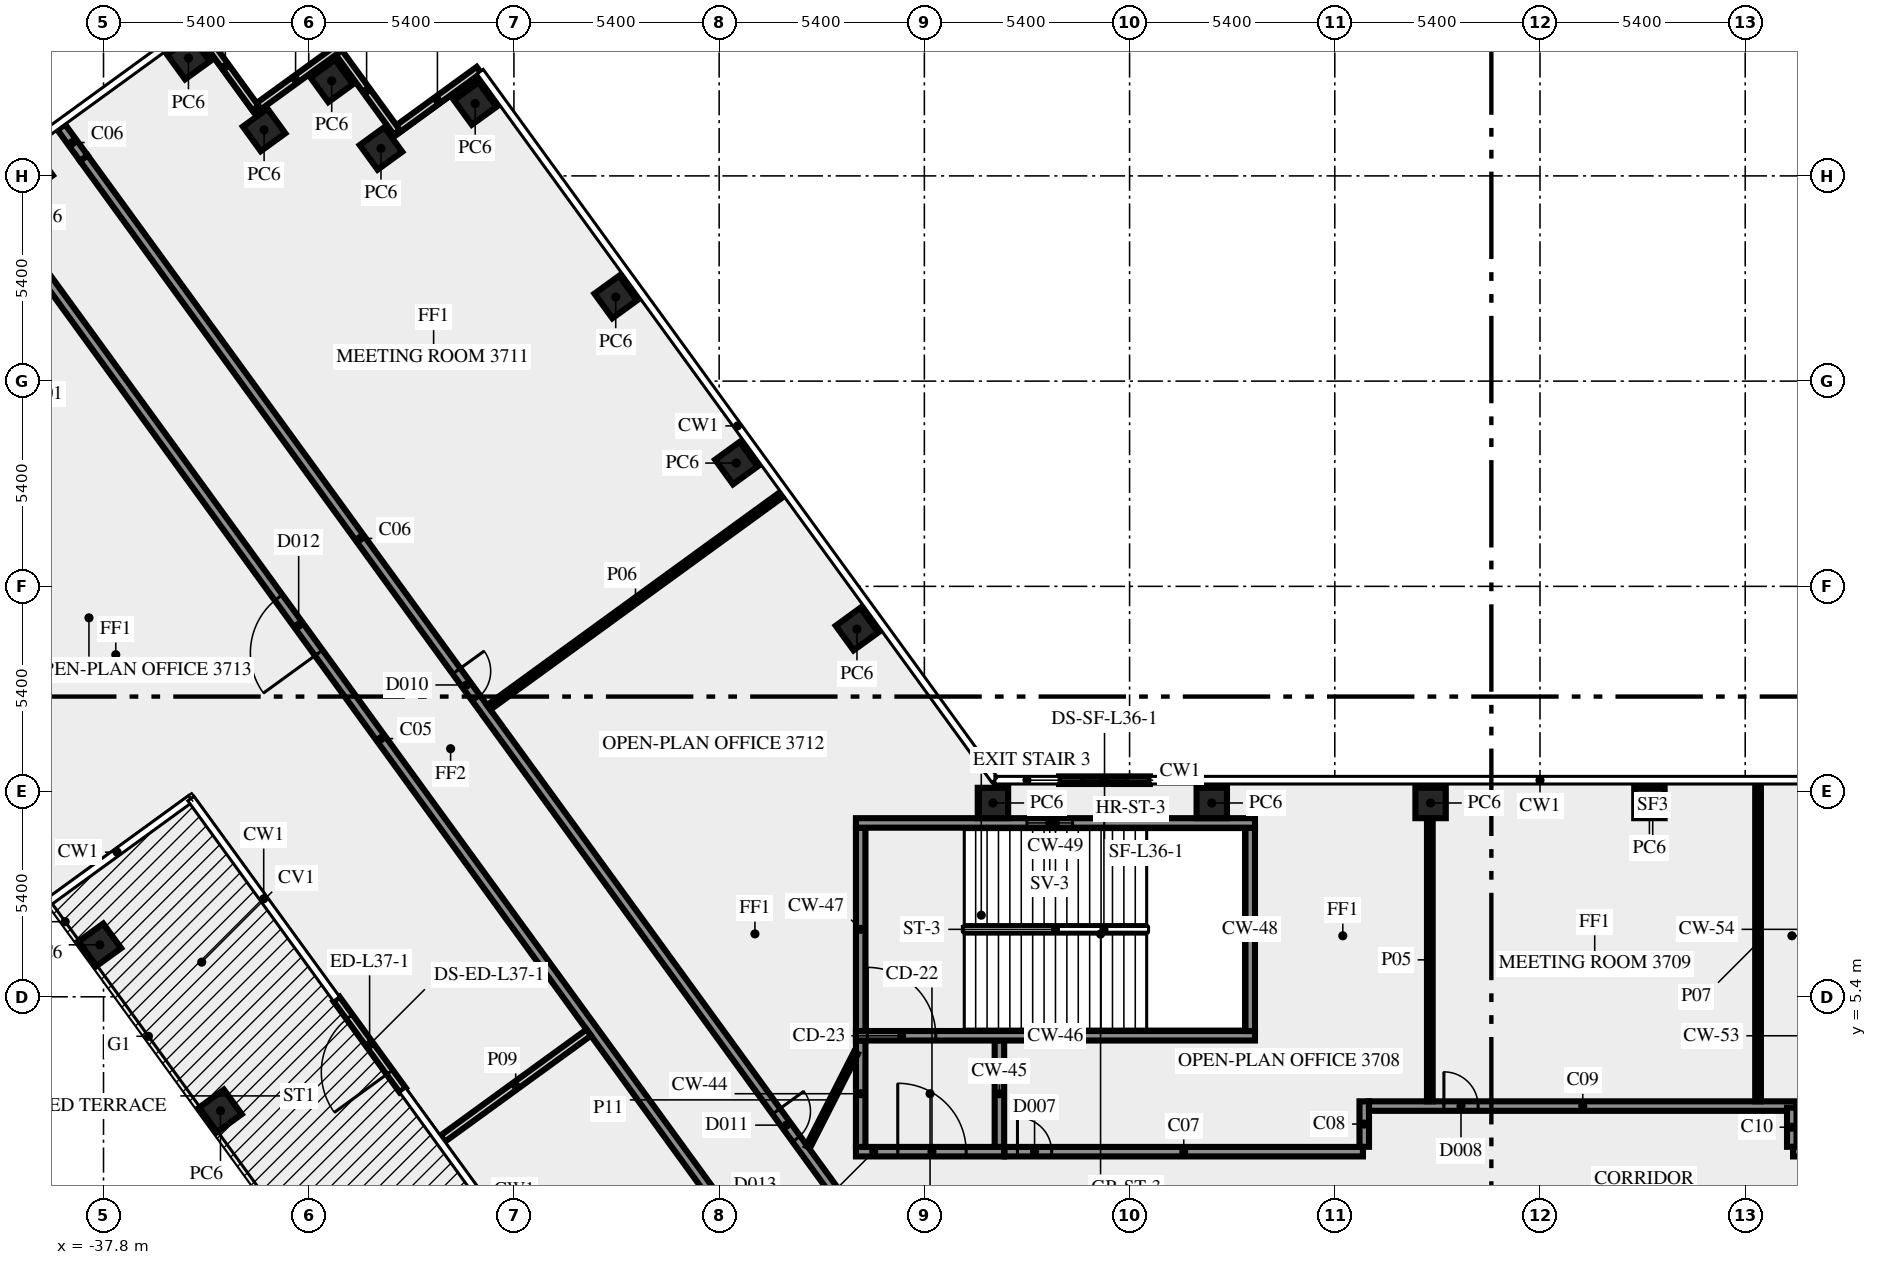
"""IFC4 building model, lengths in metres.
Left out: names, types, materials, properties, quantities, classifications, styles, units other than length and angle.
Written with IfcOpenShell. Run it as: python <this file> out.ifc"""

import sys

from ifc_helpers import new_model, si_unit, direction, frame, frame_2d, origin, origin_2d, place, context, subcontext, project, spatial, rectangle, extrude, element, fill, save


model = new_model("IFC4")
c1 = context("Model", 3, precision=1e-05, world=origin(), true_north=direction((0.0, 1.0)))
c2 = subcontext(c1, "Body", "Model", "MODEL_VIEW")
j1 = project(units=[si_unit("LENGTHUNIT", "METRE"), si_unit("PLANEANGLEUNIT", "RADIAN")], contexts=[c1])
p1 = place(None, origin())
s1 = spatial("IfcSite", under=j1, at=p1, CompositionType="ELEMENT")
p2 = place(p1, origin())
s2 = spatial("IfcBuilding", under=s1, at=p2, CompositionType="ELEMENT")
p3 = place(p2, frame((0.0, 0.0, 160.0)))
s3 = spatial("IfcBuildingStorey", under=s2, at=p3, CompositionType="ELEMENT", Elevation=160.0)
for number, where, z_axis, x_axis in (
    (1, (-17.974, 15.075, 0.0), (0.0, 0.0, 1.0), (-0.588, 0.809, 0.0)),
    (2, (-21.147, 19.444, 0.0), (0.0, 0.0, 1.0), (-0.588, 0.809, 0.0)),
    (3, (-24.321, 23.812, 0.0), (0.0, 0.0, 1.0), (-0.588, 0.809, 0.0)),
    (4, (-28.02, 28.905, 0.0), (0.0, 0.0, 1.0), (-0.809, -0.588, 0.0)),
    (5, (-30.499, 27.723, 0.0), (0.0, 0.0, 1.0), (-0.809, -0.588, 0.0)),
    (6, (-31.795, 29.5, 0.0), (0.0, 0.0, 1.0), (-0.588, 0.809, 0.0)),
    (7, (-33.574, 28.209, 0.0), (0.0, 0.0, 1.0), (-0.588, 0.809, 0.0)),
    (8, (-35.565, 30.1, 0.0), (0.0, 0.0, 1.0), (-0.809, -0.588, 0.0)),
    (9, (-39.691, 27.102, 0.0), (0.0, 0.0, 1.0), (-0.809, -0.588, 0.0)),
    (10, (-37.896, 6.769, 0.0), (0.0, 0.0, 1.0), (0.588, -0.809, 0.0)),
    (11, (-34.722, 2.4, 0.0), (0.0, 0.0, 1.0), (0.588, -0.809, 0.0)),
    (12, (2.879, 10.5, 0.0), (0.0, 0.0, 1.0), (-1.0, 0.0, 0.0)),
    (13, (-2.879, 10.5, 0.0), (0.0, 0.0, 1.0), (-1.0, 0.0, 0.0)),
    (14, (-8.637, 10.5, 0.0), (0.0, 0.0, 1.0), (-1.0, 0.0, 0.0)),
    (15, (-14.395, 10.5, 0.0), (0.0, 0.0, 1.0), (-1.0, 0.0, 0.0)),
):
    element("IfcColumn", number, at=place(p3, frame(where, z_axis=z_axis, x_axis=x_axis)), inside=s3, PredefinedType="COLUMN", context=c2, shape_type="SweptSolid", body=[
        extrude(rectangle(XDim=0.8, YDim=0.8, at=origin_2d()), origin(), (0.0, 0.0, 1.0), 3.65),
    ])
p4 = place(p3, frame((-29.927, 2.946, 0.0), z_axis=(0.0, 0.0, 1.0), x_axis=(-0.58782869016, 0.808985433135, 0.0)))
e16 = element("IfcWall", 16, at=p4, inside=s3, PredefinedType="SOLIDWALL", context=c2, shape_type="SweptSolid", body=[
    extrude(rectangle(XDim=2.963, YDim=0.2, at=frame_2d((1.481, 0.0))), origin(), (0.0, 0.0, 1.0), 3.65),
])
p5 = place(p4, frame((0.582, 0.0, 0.0)))
e17 = element("IfcOpeningElement", 17, at=p5, cuts=e16, PredefinedType="OPENING", context=c2, shape_type="SweptSolid", body=[
    extrude(rectangle(XDim=1.8, YDim=2.4, at=frame_2d((0.9, 1.2))), frame((0.0, 0.11, 0.0), z_axis=(0.0, -1.0, 0.0), x_axis=(1.0, 0.0, 0.0)), (0.0, 0.0, 1.0), 0.22),
])
for number, where, z_axis, x_axis in (
    (18, (-27.921, 29.787, 0.0), (0.0, 0.0, 1.0), (-0.809, -0.588, 0.0)),
    (19, (-30.083, 28.149, 0.0), (0.0, 0.0, 1.0), (-0.588, 0.809, 0.0)),
    (20, (-31.654, 30.331, 0.0), (0.0, 0.0, 1.0), (-0.809, -0.588, 0.0)),
    (21, (-33.801, 28.786, 0.0), (0.0, 0.0, 1.0), (-0.588, 0.809, 0.0)),
):
    element("IfcWall", number, at=place(p3, frame(where, z_axis=z_axis, x_axis=x_axis)), inside=s3, PredefinedType="SOLIDWALL", context=c2, shape_type="SweptSolid", body=[
        extrude(rectangle(XDim=2.7, YDim=0.2, at=frame_2d((1.35, 0.0))), origin(), (0.0, 0.0, 1.0), 3.65),
    ])
p6 = place(p3, frame((-10.263, 11.1, 0.0), z_axis=(0.0, 0.0, 1.0), x_axis=(-1.0, 0.0, 0.0)))
e22 = element("IfcWall", 22, at=p6, inside=s3, PredefinedType="SOLIDWALL", context=c2, shape_type="SweptSolid", body=[
    extrude(rectangle(XDim=2.392, YDim=0.2, at=frame_2d((1.196, 0.0))), origin(), (0.0, 0.0, 1.0), 3.65),
])
p7 = place(p6, frame((0.596, 0.0, 1.0)))
e23 = element("IfcOpeningElement", 23, at=p7, cuts=e22, PredefinedType="OPENING", context=c2, shape_type="SweptSolid", body=[
    extrude(rectangle(XDim=1.2, YDim=1.2, at=frame_2d((0.6, 0.6))), frame((0.0, 0.11, 0.0), z_axis=(0.0, -1.0, 0.0), x_axis=(1.0, 0.0, 0.0)), (0.0, 0.0, 1.0), 0.22),
])
p8 = place(p3, frame((-18.0, 1.325, 0.0), z_axis=(0.0, 0.0, 1.0), x_axis=(1.0, 0.0, 0.0)))
e24 = element("IfcWall", 24, at=p8, inside=s3, PredefinedType="SHEAR", context=c2, shape_type="SweptSolid", body=[
    extrude(rectangle(XDim=3.9, YDim=0.25, at=frame_2d((1.95, 0.0))), origin(), (0.0, 0.0, 1.0), 3.65),
])
p9 = place(p8, frame((1.1, 0.0, 0.0)))
e25 = element("IfcOpeningElement", 25, at=p9, cuts=e24, PredefinedType="OPENING", context=c2, shape_type="SweptSolid", body=[
    extrude(rectangle(XDim=1.8, YDim=2.1, at=frame_2d((0.9, 1.05))), frame((0.0, 0.135, 0.0), z_axis=(0.0, -1.0, 0.0), x_axis=(1.0, 0.0, 0.0)), (0.0, 0.0, 1.0), 0.27),
])
for number, where, z_axis, x_axis in (
    (26, (-17.875, 1.45, 0.0), (0.0, 0.0, 1.0), (0.0, 1.0, 0.0)),
    (27, (-14.225, 1.45, 0.0), (0.0, 0.0, 1.0), (0.0, 1.0, 0.0)),
):
    element("IfcWall", number, at=place(p3, frame(where, z_axis=z_axis, x_axis=x_axis)), inside=s3, PredefinedType="SHEAR", context=c2, shape_type="SweptSolid", body=[
        extrude(rectangle(XDim=2.8, YDim=0.25, at=frame_2d((1.4, 0.0))), origin(), (0.0, 0.0, 1.0), 3.65),
    ])
p10 = place(p3, frame((-18.0, 4.375, 0.0), z_axis=(0.0, 0.0, 1.0), x_axis=(1.0, 0.0, 0.0)))
e28 = element("IfcWall", 28, at=p10, inside=s3, PredefinedType="SHEAR", context=c2, shape_type="SweptSolid", body=[
    extrude(rectangle(XDim=10.5, YDim=0.25, at=frame_2d((5.25, 0.0))), origin(), (0.0, 0.0, 1.0), 3.65),
])
p11 = place(p10, frame((0.3, 0.0, 0.0)))
e29 = element("IfcOpeningElement", 29, at=p11, cuts=e28, PredefinedType="OPENING", context=c2, shape_type="SweptSolid", body=[
    extrude(rectangle(XDim=1.8, YDim=2.1, at=frame_2d((0.9, 1.05))), frame((0.0, 0.135, 0.0), z_axis=(0.0, -1.0, 0.0), x_axis=(1.0, 0.0, 0.0)), (0.0, 0.0, 1.0), 0.27),
])
for number, where, z_axis, x_axis in (
    (30, (-17.875, 4.5, 0.0), (0.0, 0.0, 1.0), (0.0, 1.0, 0.0)),
    (31, (-7.625, 4.5, 0.0), (0.0, 0.0, 1.0), (0.0, 1.0, 0.0)),
):
    element("IfcWall", number, at=place(p3, frame(where, z_axis=z_axis, x_axis=x_axis)), inside=s3, PredefinedType="SHEAR", context=c2, shape_type="SweptSolid", body=[
        extrude(rectangle(XDim=5.35, YDim=0.25, at=frame_2d((2.675, 0.0))), origin(), (0.0, 0.0, 1.0), 3.65),
    ])
p12 = place(p3, frame((-18.0, 9.975, 0.0), z_axis=(0.0, 0.0, 1.0), x_axis=(1.0, 0.0, 0.0)))
e32 = element("IfcWall", 32, at=p12, inside=s3, PredefinedType="SHEAR", context=c2, shape_type="SweptSolid", body=[
    extrude(rectangle(XDim=10.5, YDim=0.25, at=frame_2d((5.25, 0.0))), origin(), (0.0, 0.0, 1.0), 3.65),
])
p13 = place(p12, frame((4.5, 0.0, 1.0)))
e33 = element("IfcOpeningElement", 33, at=p13, cuts=e32, PredefinedType="OPENING", context=c2, shape_type="SweptSolid", body=[
    extrude(rectangle(XDim=1.2, YDim=1.2, at=frame_2d((0.6, 0.6))), frame((0.0, 0.135, 0.0), z_axis=(0.0, -1.0, 0.0), x_axis=(1.0, 0.0, 0.0)), (0.0, 0.0, 1.0), 0.27),
])
p14 = place(p3, frame((6.659, 1.325, 0.0), z_axis=(0.0, 0.0, 1.0), x_axis=(1.0, 0.0, 0.0)))
e34 = element("IfcWall", 34, at=p14, inside=s3, PredefinedType="SOLIDWALL", context=c2, shape_type="SweptSolid", body=[
    extrude(rectangle(XDim=7.431, YDim=0.25, at=frame_2d((3.716, 0.0))), origin(), (0.0, 0.0, 1.0), 3.65),
])
p15 = place(p14, frame((6.191, 0.0, 0.0)))
e35 = element("IfcOpeningElement", 35, at=p15, cuts=e34, PredefinedType="OPENING", context=c2, shape_type="SweptSolid", body=[
    extrude(rectangle(XDim=0.9, YDim=2.1, at=frame_2d((0.45, 1.05))), frame((0.0, 0.135, 0.0), z_axis=(0.0, -1.0, 0.0), x_axis=(1.0, 0.0, 0.0)), (0.0, 0.0, 1.0), 0.27),
])
p16 = place(p3, frame((-20.531, -1.523, 0.0), z_axis=(0.0, 0.0, 1.0), x_axis=(-0.587781654618, 0.809019608226, 0.0)))
e36 = element("IfcWall", 36, at=p16, inside=s3, PredefinedType="SOLIDWALL", context=c2, shape_type="SweptSolid", body=[
    extrude(rectangle(XDim=33.911, YDim=0.25, at=frame_2d((16.956, 0.0))), origin(), (0.0, 0.0, 1.0), 3.65),
])
p17 = place(p16, frame((19.743, 0.0, 0.0)))
e37 = element("IfcOpeningElement", 37, at=p17, cuts=e36, PredefinedType="OPENING", context=c2, shape_type="SweptSolid", body=[
    extrude(rectangle(XDim=1.8, YDim=2.1, at=frame_2d((0.9, 1.05))), frame((0.0, 0.135, 0.0), z_axis=(0.0, -1.0, 0.0), x_axis=(1.0, 0.0, 0.0)), (0.0, 0.0, 1.0), 0.27),
])
p18 = place(p16, frame((0.533, 0.0, 0.0)))
e38 = element("IfcOpeningElement", 38, at=p18, cuts=e36, PredefinedType="OPENING", context=c2, shape_type="SweptSolid", body=[
    extrude(rectangle(XDim=0.9, YDim=2.1, at=frame_2d((0.45, 1.05))), frame((0.0, 0.135, 0.0), z_axis=(0.0, -1.0, 0.0), x_axis=(1.0, 0.0, 0.0)), (0.0, 0.0, 1.0), 0.27),
])
p19 = place(p3, frame((-38.32, 27.469, 0.0), z_axis=(0.0, 0.0, 1.0), x_axis=(0.587788021768, -0.809014982226, 0.0)))
e39 = element("IfcWall", 39, at=p19, inside=s3, PredefinedType="SOLIDWALL", context=c2, shape_type="SweptSolid", body=[
    extrude(rectangle(XDim=35.344, YDim=0.25, at=frame_2d((17.672, 0.0))), origin(), (0.0, 0.0, 1.0), 3.65),
])
p20 = place(p19, frame((31.003, 0.0, 0.0)))
e40 = element("IfcOpeningElement", 40, at=p20, cuts=e39, PredefinedType="OPENING", context=c2, shape_type="SweptSolid", body=[
    extrude(rectangle(XDim=0.9, YDim=2.1, at=frame_2d((0.45, 1.05))), frame((0.0, 0.135, 0.0), z_axis=(0.0, -1.0, 0.0), x_axis=(1.0, 0.0, 0.0)), (0.0, 0.0, 1.0), 0.27),
])
p21 = place(p19, frame((16.687, 0.0, 0.0)))
e41 = element("IfcOpeningElement", 41, at=p21, cuts=e39, PredefinedType="OPENING", context=c2, shape_type="SweptSolid", body=[
    extrude(rectangle(XDim=0.9, YDim=2.1, at=frame_2d((0.45, 1.05))), frame((0.0, 0.135, 0.0), z_axis=(0.0, -1.0, 0.0), x_axis=(1.0, 0.0, 0.0)), (0.0, 0.0, 1.0), 0.27),
])
p22 = place(p3, frame((-14.09, 1.325, 0.0), z_axis=(0.0, 0.0, 1.0), x_axis=(1.0, 0.0, 0.0)))
e42 = element("IfcWall", 42, at=p22, inside=s3, PredefinedType="SOLIDWALL", context=c2, shape_type="SweptSolid", body=[
    extrude(rectangle(XDim=9.431, YDim=0.25, at=frame_2d((4.716, 0.0))), origin(), (0.0, 0.0, 1.0), 3.65),
])
p23 = place(p22, frame((0.34, 0.0, 0.0)))
e43 = element("IfcOpeningElement", 43, at=p23, cuts=e42, PredefinedType="OPENING", context=c2, shape_type="SweptSolid", body=[
    extrude(rectangle(XDim=0.9, YDim=2.1, at=frame_2d((0.45, 1.05))), frame((0.0, 0.135, 0.0), z_axis=(0.0, -1.0, 0.0), x_axis=(1.0, 0.0, 0.0)), (0.0, 0.0, 1.0), 0.27),
])
p24 = place(p3, frame((-4.625, 1.454, 0.0), z_axis=(0.0, 0.0, 1.0), x_axis=(0.0, 1.0, 0.0)))
e44 = element("IfcWall", 44, at=p24, inside=s3, PredefinedType="SOLIDWALL", context=c2, shape_type="SweptSolid", body=[
    extrude(rectangle(XDim=1.196, YDim=0.25, at=frame_2d((0.598, 0.0))), origin(), (0.0, 0.0, 1.0), 3.65),
])
p25 = place(p3, frame((-4.5, 2.525, 0.0), z_axis=(0.0, 0.0, 1.0), x_axis=(1.0, 0.0, 0.0)))
e45 = element("IfcWall", 45, at=p25, inside=s3, PredefinedType="SOLIDWALL", context=c2, shape_type="SweptSolid", body=[
    extrude(rectangle(XDim=11.25, YDim=0.25, at=frame_2d((5.625, 0.0))), origin(), (0.0, 0.0, 1.0), 3.65),
])
p26 = place(p25, frame((1.971, 0.0, 0.0)))
e46 = element("IfcOpeningElement", 46, at=p26, cuts=e45, PredefinedType="OPENING", context=c2, shape_type="SweptSolid", body=[
    extrude(rectangle(XDim=0.9, YDim=2.1, at=frame_2d((0.45, 1.05))), frame((0.0, 0.135, 0.0), z_axis=(0.0, -1.0, 0.0), x_axis=(1.0, 0.0, 0.0)), (0.0, 0.0, 1.0), 0.27),
])
p27 = place(p3, frame((6.625, 2.484, 0.0), z_axis=(0.0, 0.0, 1.0), x_axis=(0.0, -1.0, 0.0)))
e47 = element("IfcWall", 47, at=p27, inside=s3, PredefinedType="SOLIDWALL", context=c2, shape_type="SweptSolid", body=[
    extrude(rectangle(XDim=1.03, YDim=0.25, at=frame_2d((0.515, 0.0))), origin(), (0.0, 0.0, 1.0), 3.65),
])
p28 = place(p3, frame((-2.899, 2.65, 0.0), z_axis=(0.0, 0.0, 1.0), x_axis=(0.0, 1.0, 0.0)))
e48 = element("IfcWall", 48, at=p28, inside=s3, PredefinedType="PARTITIONING", context=c2, shape_type="SweptSolid", body=[
    extrude(rectangle(XDim=7.445, YDim=0.15, at=frame_2d((3.723, 0.0))), origin(), (0.0, 0.0, 1.0), 3.65),
])
p29 = place(p3, frame((-19.938, 18.629, 0.0), z_axis=(0.0, 0.0, 1.0), x_axis=(-0.80900684162, -0.587799226107, 0.0)))
e49 = element("IfcWall", 49, at=p29, inside=s3, PredefinedType="PARTITIONING", context=c2, shape_type="SweptSolid", body=[
    extrude(rectangle(XDim=9.55, YDim=0.15, at=frame_2d((4.775, 0.0))), origin(), (0.0, 0.0, 1.0), 2.85),
])
p30 = place(p3, frame((5.738, 2.65, 0.0), z_axis=(0.0, 0.0, 1.0), x_axis=(0.0, 1.0, 0.0)))
e50 = element("IfcWall", 50, at=p30, inside=s3, PredefinedType="PARTITIONING", context=c2, shape_type="SweptSolid", body=[
    extrude(rectangle(XDim=8.35, YDim=0.15, at=frame_2d((4.175, 0.0))), origin(), (0.0, 0.0, 1.0), 2.85),
])
p31 = place(p3, frame((-28.875, 1.667, 0.0), z_axis=(0.0, 0.0, 1.0), x_axis=(0.80907155287, 0.587710151637, 0.0)))
e51 = element("IfcWall", 51, at=p31, inside=s3, PredefinedType="SOLIDWALL", context=c2, shape_type="SweptSolid", body=[
    extrude(rectangle(XDim=4.75, YDim=0.2, at=frame_2d((2.375, 0.0))), origin(), (0.0, 0.0, 1.0), 3.65),
])
p32 = place(p3, frame((-19.261, 1.45, 0.0), z_axis=(0.0, 0.0, 1.0), x_axis=(0.453950796792, 0.891026752736, 0.0)))
e52 = element("IfcWall", 52, at=p32, inside=s3, PredefinedType="PARTITIONING", context=c2, shape_type="SweptSolid", body=[
    extrude(rectangle(XDim=2.778, YDim=0.12, at=frame_2d((1.389, 0.0))), origin(), (0.0, 0.0, 1.0), 3.65),
])
p33 = place(p3, frame((-38.32, 27.469, 0.0), z_axis=(0.0, 0.0, 1.0), x_axis=(-0.587811913486, 0.808997623213, 0.0)))
e53 = element("IfcWall", 53, at=p33, inside=s3, PredefinedType="SOLIDWALL", context=c2, shape_type="SweptSolid", body=[
    extrude(rectangle(XDim=1.009, YDim=0.25, at=frame_2d((0.504, 0.0))), origin(), (0.0, 0.0, 1.0), 2.85),
])
p34 = place(p5, origin())
e54 = element("IfcDoor", 54, at=p34, inside=s3, OperationType="DOUBLE_DOOR_SINGLE_SWING", PredefinedType="DOOR", context=c2, shape_type="SweptSolid", body=[
    extrude(rectangle(XDim=1.8, YDim=2.4, at=frame_2d((0.9, 1.2))), frame((0.0, 0.025, 0.0), z_axis=(0.0, -1.0, 0.0), x_axis=(1.0, 0.0, 0.0)), (0.0, 0.0, 1.0), 0.05),
])
fill(e17, e54)
p35 = place(p7, origin())
e55 = element("IfcWindow", 55, at=p35, inside=s3, PartitioningType="SINGLE_PANEL", PredefinedType="WINDOW", context=c2, shape_type="SweptSolid", body=[
    extrude(rectangle(XDim=1.2, YDim=1.2, at=frame_2d((0.6, 0.6))), frame((0.0, 0.03, 0.0), z_axis=(0.0, -1.0, 0.0), x_axis=(1.0, 0.0, 0.0)), (0.0, 0.0, 1.0), 0.06),
])
fill(e23, e55)
p36 = place(p9, origin())
e56 = element("IfcDoor", 56, at=p36, inside=s3, OperationType="DOUBLE_DOOR_SINGLE_SWING", PredefinedType="DOOR", context=c2, shape_type="SweptSolid", body=[
    extrude(rectangle(XDim=1.8, YDim=2.1, at=frame_2d((0.9, 1.05))), frame((0.0, 0.025, 0.0), z_axis=(0.0, -1.0, 0.0), x_axis=(1.0, 0.0, 0.0)), (0.0, 0.0, 1.0), 0.05),
])
fill(e25, e56)
p37 = place(p11, origin())
e57 = element("IfcDoor", 57, at=p37, inside=s3, OperationType="DOUBLE_DOOR_SINGLE_SWING", PredefinedType="DOOR", context=c2, shape_type="SweptSolid", body=[
    extrude(rectangle(XDim=1.8, YDim=2.1, at=frame_2d((0.9, 1.05))), frame((0.0, 0.025, 0.0), z_axis=(0.0, -1.0, 0.0), x_axis=(1.0, 0.0, 0.0)), (0.0, 0.0, 1.0), 0.05),
])
fill(e29, e57)
p38 = place(p13, origin())
e58 = element("IfcWindow", 58, at=p38, inside=s3, PartitioningType="SINGLE_PANEL", PredefinedType="WINDOW", context=c2, shape_type="SweptSolid", body=[
    extrude(rectangle(XDim=1.2, YDim=1.2, at=frame_2d((0.6, 0.6))), frame((0.0, 0.03, 0.0), z_axis=(0.0, -1.0, 0.0), x_axis=(1.0, 0.0, 0.0)), (0.0, 0.0, 1.0), 0.06),
])
fill(e33, e58)
p39 = place(p23, origin())
e59 = element("IfcDoor", 59, at=p39, inside=s3, OperationType="SINGLE_SWING_LEFT", PredefinedType="DOOR", context=c2, shape_type="SweptSolid", body=[
    extrude(rectangle(XDim=0.9, YDim=2.1, at=frame_2d((0.45, 1.05))), frame((0.0, 0.025, 0.0), z_axis=(0.0, -1.0, 0.0), x_axis=(1.0, 0.0, 0.0)), (0.0, 0.0, 1.0), 0.05),
])
fill(e43, e59)
p40 = place(p20, origin())
e60 = element("IfcDoor", 60, at=p40, inside=s3, OperationType="SINGLE_SWING_RIGHT", PredefinedType="DOOR", context=c2, shape_type="SweptSolid", body=[
    extrude(rectangle(XDim=0.9, YDim=2.1, at=frame_2d((0.45, 1.05))), frame((0.0, 0.025, 0.0), z_axis=(0.0, -1.0, 0.0), x_axis=(1.0, 0.0, 0.0)), (0.0, 0.0, 1.0), 0.05),
])
fill(e40, e60)
p41 = place(p26, origin())
e61 = element("IfcDoor", 61, at=p41, inside=s3, OperationType="SINGLE_SWING_LEFT", PredefinedType="DOOR", context=c2, shape_type="SweptSolid", body=[
    extrude(rectangle(XDim=0.9, YDim=2.1, at=frame_2d((0.45, 1.05))), frame((0.0, 0.025, 0.0), z_axis=(0.0, -1.0, 0.0), x_axis=(1.0, 0.0, 0.0)), (0.0, 0.0, 1.0), 0.05),
])
fill(e46, e61)
p42 = place(p21, origin())
e62 = element("IfcDoor", 62, at=p42, inside=s3, OperationType="SINGLE_SWING_RIGHT", PredefinedType="DOOR", context=c2, shape_type="SweptSolid", body=[
    extrude(rectangle(XDim=0.9, YDim=2.1, at=frame_2d((0.45, 1.05))), frame((0.0, 0.025, 0.0), z_axis=(0.0, -1.0, 0.0), x_axis=(1.0, 0.0, 0.0)), (0.0, 0.0, 1.0), 0.05),
])
fill(e41, e62)
p43 = place(p17, origin())
e63 = element("IfcDoor", 63, at=p43, inside=s3, OperationType="DOUBLE_DOOR_SINGLE_SWING", PredefinedType="DOOR", context=c2, shape_type="SweptSolid", body=[
    extrude(rectangle(XDim=1.8, YDim=2.1, at=frame_2d((0.9, 1.05))), frame((0.0, 0.025, 0.0), z_axis=(0.0, -1.0, 0.0), x_axis=(1.0, 0.0, 0.0)), (0.0, 0.0, 1.0), 0.05),
])
fill(e37, e63)
save(model, sys.argv[1])
